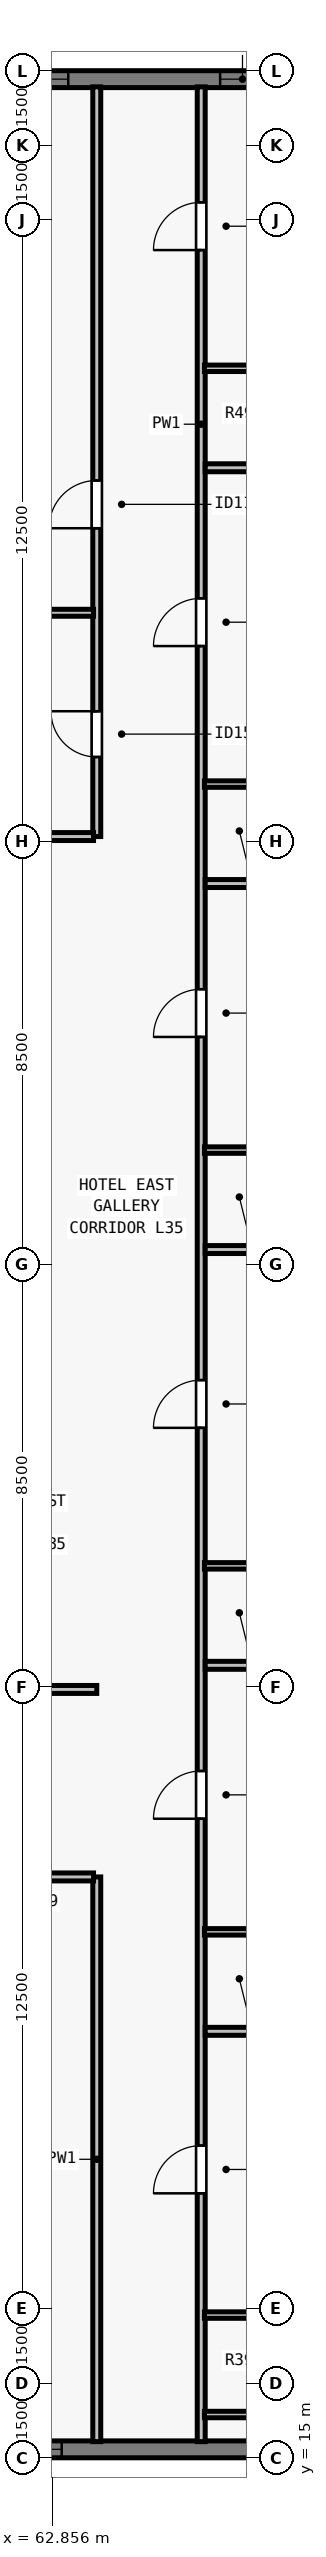
"""IFC4 building model, lengths in metres.
Left out: names, types, materials, properties, quantities, classifications, styles, units other than length and angle.
Written with IfcOpenShell. Run it as: python <this file> out.ifc"""

import sys

from ifc_helpers import new_model, si_unit, direction, frame, frame_2d, origin, place, context, subcontext, project, spatial, rectangle, extrude, element, fill, save


model = new_model("IFC4")
c1 = context("Model", 3, precision=1e-05, world=origin(), true_north=direction((0.0, 1.0)))
c2 = subcontext(c1, "Body", "Model", "MODEL_VIEW")
j1 = project(units=[si_unit("LENGTHUNIT", "METRE"), si_unit("PLANEANGLEUNIT", "RADIAN")], contexts=[c1])
p1 = place(None, origin())
s1 = spatial("IfcSite", under=j1, at=p1, CompositionType="ELEMENT")
p2 = place(p1, origin())
s2 = spatial("IfcBuilding", under=s1, at=p2, CompositionType="ELEMENT")
p3 = place(p2, frame((0.0, 0.0, 130.5)))
s3 = spatial("IfcBuildingStorey", under=s2, at=p3, CompositionType="ELEMENT", Elevation=130.5)
p4 = place(p3, frame((32.0, 62.83, 0.0), z_axis=(0.0, 0.0, 1.0), x_axis=(1.0, 0.0, 0.0)))
e1 = element("IfcWall", 1, at=p4, inside=s3, PredefinedType="SOLIDWALL", context=c2, shape_type="SweptSolid", body=[
    extrude(rectangle(XDim=39.682, YDim=0.34, at=frame_2d((19.841, 0.0))), origin(), (0.0, 0.0, 1.0), 3.28),
])
p5 = place(p4, frame((4.752, 0.0, 0.8)))
e2 = element("IfcOpeningElement", 2, at=p5, cuts=e1, PredefinedType="OPENING", context=c2, shape_type="SweptSolid", body=[
    extrude(rectangle(XDim=1.75, YDim=1.66, at=frame_2d((0.875, 0.83))), frame((0.0, 0.18, 0.0), z_axis=(0.0, -1.0, 0.0), x_axis=(1.0, 0.0, 0.0)), (0.0, 0.0, 1.0), 0.36),
])
p6 = place(p4, frame((11.859, 0.0, 0.8)))
e3 = element("IfcOpeningElement", 3, at=p6, cuts=e1, PredefinedType="OPENING", context=c2, shape_type="SweptSolid", body=[
    extrude(rectangle(XDim=1.75, YDim=1.66, at=frame_2d((0.875, 0.83))), frame((0.0, 0.18, 0.0), z_axis=(0.0, -1.0, 0.0), x_axis=(1.0, 0.0, 0.0)), (0.0, 0.0, 1.0), 0.36),
])
p7 = place(p4, frame((16.062, 0.0, 0.8)))
e4 = element("IfcOpeningElement", 4, at=p7, cuts=e1, PredefinedType="OPENING", context=c2, shape_type="SweptSolid", body=[
    extrude(rectangle(XDim=1.35, YDim=1.66, at=frame_2d((0.675, 0.83))), frame((0.0, 0.18, 0.0), z_axis=(0.0, -1.0, 0.0), x_axis=(1.0, 0.0, 0.0)), (0.0, 0.0, 1.0), 0.36),
])
p8 = place(p4, frame((18.966, 0.0, 0.8)))
e5 = element("IfcOpeningElement", 5, at=p8, cuts=e1, PredefinedType="OPENING", context=c2, shape_type="SweptSolid", body=[
    extrude(rectangle(XDim=1.75, YDim=1.66, at=frame_2d((0.875, 0.83))), frame((0.0, 0.18, 0.0), z_axis=(0.0, -1.0, 0.0), x_axis=(1.0, 0.0, 0.0)), (0.0, 0.0, 1.0), 0.36),
])
p9 = place(p4, frame((22.719, 0.0, 0.8)))
e6 = element("IfcOpeningElement", 6, at=p9, cuts=e1, PredefinedType="OPENING", context=c2, shape_type="SweptSolid", body=[
    extrude(rectangle(XDim=1.35, YDim=1.66, at=frame_2d((0.675, 0.83))), frame((0.0, 0.18, 0.0), z_axis=(0.0, -1.0, 0.0), x_axis=(1.0, 0.0, 0.0)), (0.0, 0.0, 1.0), 0.36),
])
p10 = place(p4, frame((26.073, 0.0, 0.8)))
e7 = element("IfcOpeningElement", 7, at=p10, cuts=e1, PredefinedType="OPENING", context=c2, shape_type="SweptSolid", body=[
    extrude(rectangle(XDim=1.75, YDim=1.66, at=frame_2d((0.875, 0.83))), frame((0.0, 0.18, 0.0), z_axis=(0.0, -1.0, 0.0), x_axis=(1.0, 0.0, 0.0)), (0.0, 0.0, 1.0), 0.36),
])
p11 = place(p4, frame((29.827, 0.0, 0.8)))
e8 = element("IfcOpeningElement", 8, at=p11, cuts=e1, PredefinedType="OPENING", context=c2, shape_type="SweptSolid", body=[
    extrude(rectangle(XDim=1.35, YDim=1.66, at=frame_2d((0.675, 0.83))), frame((0.0, 0.18, 0.0), z_axis=(0.0, -1.0, 0.0), x_axis=(1.0, 0.0, 0.0)), (0.0, 0.0, 1.0), 0.36),
])
p12 = place(p4, frame((34.23, 0.0, 0.8)))
e9 = element("IfcOpeningElement", 9, at=p12, cuts=e1, PredefinedType="OPENING", context=c2, shape_type="SweptSolid", body=[
    extrude(rectangle(XDim=0.9, YDim=1.66, at=frame_2d((0.45, 0.83))), frame((0.0, 0.18, 0.0), z_axis=(0.0, -1.0, 0.0), x_axis=(1.0, 0.0, 0.0)), (0.0, 0.0, 1.0), 0.36),
])
p13 = place(p3, frame((72.0, 15.17, 0.0), z_axis=(0.0, 0.0, 1.0), x_axis=(-1.0, 0.0, 0.0)))
e10 = element("IfcWall", 10, at=p13, inside=s3, PredefinedType="SOLIDWALL", context=c2, shape_type="SweptSolid", body=[
    extrude(rectangle(XDim=39.682, YDim=0.34, at=frame_2d((19.841, 0.0))), origin(), (0.0, 0.0, 1.0), 3.28),
])
p14 = place(p13, frame((8.955, 0.0, 0.8)))
e11 = element("IfcOpeningElement", 11, at=p14, cuts=e10, PredefinedType="OPENING", context=c2, shape_type="SweptSolid", body=[
    extrude(rectangle(XDim=1.35, YDim=1.66, at=frame_2d((0.675, 0.83))), frame((0.0, 0.18, 0.0), z_axis=(0.0, -1.0, 0.0), x_axis=(1.0, 0.0, 0.0)), (0.0, 0.0, 1.0), 0.36),
])
p15 = place(p13, frame((11.859, 0.0, 0.8)))
e12 = element("IfcOpeningElement", 12, at=p15, cuts=e10, PredefinedType="OPENING", context=c2, shape_type="SweptSolid", body=[
    extrude(rectangle(XDim=1.75, YDim=1.66, at=frame_2d((0.875, 0.83))), frame((0.0, 0.18, 0.0), z_axis=(0.0, -1.0, 0.0), x_axis=(1.0, 0.0, 0.0)), (0.0, 0.0, 1.0), 0.36),
])
p16 = place(p13, frame((16.062, 0.0, 0.8)))
e13 = element("IfcOpeningElement", 13, at=p16, cuts=e10, PredefinedType="OPENING", context=c2, shape_type="SweptSolid", body=[
    extrude(rectangle(XDim=1.35, YDim=1.66, at=frame_2d((0.675, 0.83))), frame((0.0, 0.18, 0.0), z_axis=(0.0, -1.0, 0.0), x_axis=(1.0, 0.0, 0.0)), (0.0, 0.0, 1.0), 0.36),
])
p17 = place(p13, frame((18.966, 0.0, 0.8)))
e14 = element("IfcOpeningElement", 14, at=p17, cuts=e10, PredefinedType="OPENING", context=c2, shape_type="SweptSolid", body=[
    extrude(rectangle(XDim=1.75, YDim=1.66, at=frame_2d((0.875, 0.83))), frame((0.0, 0.18, 0.0), z_axis=(0.0, -1.0, 0.0), x_axis=(1.0, 0.0, 0.0)), (0.0, 0.0, 1.0), 0.36),
])
p18 = place(p13, frame((21.469, 0.0, 0.8)))
e15 = element("IfcOpeningElement", 15, at=p18, cuts=e10, PredefinedType="OPENING", context=c2, shape_type="SweptSolid", body=[
    extrude(rectangle(XDim=1.35, YDim=1.66, at=frame_2d((0.675, 0.83))), frame((0.0, 0.18, 0.0), z_axis=(0.0, -1.0, 0.0), x_axis=(1.0, 0.0, 0.0)), (0.0, 0.0, 1.0), 0.36),
])
p19 = place(p13, frame((26.073, 0.0, 0.8)))
e16 = element("IfcOpeningElement", 16, at=p19, cuts=e10, PredefinedType="OPENING", context=c2, shape_type="SweptSolid", body=[
    extrude(rectangle(XDim=1.75, YDim=1.66, at=frame_2d((0.875, 0.83))), frame((0.0, 0.18, 0.0), z_axis=(0.0, -1.0, 0.0), x_axis=(1.0, 0.0, 0.0)), (0.0, 0.0, 1.0), 0.36),
])
p20 = place(p13, frame((28.577, 0.0, 0.8)))
e17 = element("IfcOpeningElement", 17, at=p20, cuts=e10, PredefinedType="OPENING", context=c2, shape_type="SweptSolid", body=[
    extrude(rectangle(XDim=1.35, YDim=1.66, at=frame_2d((0.675, 0.83))), frame((0.0, 0.18, 0.0), z_axis=(0.0, -1.0, 0.0), x_axis=(1.0, 0.0, 0.0)), (0.0, 0.0, 1.0), 0.36),
])
p21 = place(p3, frame((65.85, 15.325, 0.0), z_axis=(0.0, 0.0, 1.0), x_axis=(0.0, 1.0, 0.0)))
e18 = element("IfcWall", 18, at=p21, inside=s3, PredefinedType="PARTITIONING", context=c2, shape_type="SweptSolid", body=[
    extrude(rectangle(XDim=47.35, YDim=0.16, at=frame_2d((23.675, 0.0))), origin(), (0.0, 0.0, 1.0), 2.555),
])
p22 = place(p21, frame((4.993, 0.0, 0.0)))
e19 = element("IfcOpeningElement", 19, at=p22, cuts=e18, PredefinedType="OPENING", context=c2, shape_type="SweptSolid", body=[
    extrude(rectangle(XDim=0.96, YDim=2.15, at=frame_2d((0.48, 1.075))), frame((0.0, 0.09, 0.0), z_axis=(0.0, -1.0, 0.0), x_axis=(1.0, 0.0, 0.0)), (0.0, 0.0, 1.0), 0.18),
])
p23 = place(p21, frame((12.525, 0.0, 0.0)))
e20 = element("IfcOpeningElement", 20, at=p23, cuts=e18, PredefinedType="OPENING", context=c2, shape_type="SweptSolid", body=[
    extrude(rectangle(XDim=0.96, YDim=2.15, at=frame_2d((0.48, 1.075))), frame((0.0, 0.09, 0.0), z_axis=(0.0, -1.0, 0.0), x_axis=(1.0, 0.0, 0.0)), (0.0, 0.0, 1.0), 0.18),
])
p24 = place(p21, frame((20.385, 0.0, 0.0)))
e21 = element("IfcOpeningElement", 21, at=p24, cuts=e18, PredefinedType="OPENING", context=c2, shape_type="SweptSolid", body=[
    extrude(rectangle(XDim=0.96, YDim=2.15, at=frame_2d((0.48, 1.075))), frame((0.0, 0.09, 0.0), z_axis=(0.0, -1.0, 0.0), x_axis=(1.0, 0.0, 0.0)), (0.0, 0.0, 1.0), 0.18),
])
p25 = place(p21, frame((28.246, 0.0, 0.0)))
e22 = element("IfcOpeningElement", 22, at=p25, cuts=e18, PredefinedType="OPENING", context=c2, shape_type="SweptSolid", body=[
    extrude(rectangle(XDim=0.96, YDim=2.15, at=frame_2d((0.48, 1.075))), frame((0.0, 0.09, 0.0), z_axis=(0.0, -1.0, 0.0), x_axis=(1.0, 0.0, 0.0)), (0.0, 0.0, 1.0), 0.18),
])
p26 = place(p21, frame((36.105, 0.0, 0.0)))
e23 = element("IfcOpeningElement", 23, at=p26, cuts=e18, PredefinedType="OPENING", context=c2, shape_type="SweptSolid", body=[
    extrude(rectangle(XDim=0.96, YDim=2.15, at=frame_2d((0.48, 1.075))), frame((0.0, 0.09, 0.0), z_axis=(0.0, -1.0, 0.0), x_axis=(1.0, 0.0, 0.0)), (0.0, 0.0, 1.0), 0.18),
])
p27 = place(p21, frame((44.068, 0.0, 0.0)))
e24 = element("IfcOpeningElement", 24, at=p27, cuts=e18, PredefinedType="OPENING", context=c2, shape_type="SweptSolid", body=[
    extrude(rectangle(XDim=0.96, YDim=2.15, at=frame_2d((0.48, 1.075))), frame((0.0, 0.09, 0.0), z_axis=(0.0, -1.0, 0.0), x_axis=(1.0, 0.0, 0.0)), (0.0, 0.0, 1.0), 0.18),
])
p28 = place(p3, frame((63.75, 15.325, 0.0), z_axis=(0.0, 0.0, 1.0), x_axis=(0.0, 1.0, 0.0)))
e25 = element("IfcWall", 25, at=p28, inside=s3, PredefinedType="PARTITIONING", context=c2, shape_type="SweptSolid", body=[
    extrude(rectangle(XDim=11.355, YDim=0.16, at=frame_2d((5.677, 0.0))), origin(), (0.0, 0.0, 1.0), 2.555),
])
p29 = place(p3, frame((63.75, 47.6, 0.0), z_axis=(0.0, 0.0, 1.0), x_axis=(0.0, 1.0, 0.0)))
e26 = element("IfcWall", 26, at=p29, inside=s3, PredefinedType="PARTITIONING", context=c2, shape_type="SweptSolid", body=[
    extrude(rectangle(XDim=15.075, YDim=0.16, at=frame_2d((7.538, 0.0))), origin(), (0.0, 0.0, 1.0), 2.555),
])
p30 = place(p29, frame((1.6, 0.0, 0.0)))
e27 = element("IfcOpeningElement", 27, at=p30, cuts=e26, PredefinedType="OPENING", context=c2, shape_type="SweptSolid", body=[
    extrude(rectangle(XDim=0.92, YDim=2.12, at=frame_2d((0.46, 1.06))), frame((0.0, 0.09, 0.0), z_axis=(0.0, -1.0, 0.0), x_axis=(1.0, 0.0, 0.0)), (0.0, 0.0, 1.0), 0.18),
])
p31 = place(p29, frame((6.2, 0.0, 0.0)))
e28 = element("IfcOpeningElement", 28, at=p31, cuts=e26, PredefinedType="OPENING", context=c2, shape_type="SweptSolid", body=[
    extrude(rectangle(XDim=0.96, YDim=2.12, at=frame_2d((0.48, 1.06))), frame((0.0, 0.09, 0.0), z_axis=(0.0, -1.0, 0.0), x_axis=(1.0, 0.0, 0.0)), (0.0, 0.0, 1.0), 0.18),
])
p32 = place(p3, frame((60.765, 30.45, 0.0), z_axis=(0.0, 0.0, 1.0), x_axis=(1.0, 0.0, 0.0)))
e29 = element("IfcWall", 29, at=p32, inside=s3, PredefinedType="PARTITIONING", context=c2, shape_type="SweptSolid", body=[
    extrude(rectangle(XDim=2.985, YDim=0.16, at=frame_2d((1.493, 0.0))), origin(), (0.0, 0.0, 1.0), 3.28),
])
p33 = place(p3, frame((60.765, 47.6, 0.0), z_axis=(0.0, 0.0, 1.0), x_axis=(1.0, 0.0, 0.0)))
e30 = element("IfcWall", 30, at=p33, inside=s3, PredefinedType="PARTITIONING", context=c2, shape_type="SweptSolid", body=[
    extrude(rectangle(XDim=2.92, YDim=0.16, at=frame_2d((1.46, 0.0))), origin(), (0.0, 0.0, 1.0), 3.28),
])
p34 = place(p3, frame((41.615, 26.68, 0.0), z_axis=(0.0, 0.0, 1.0), x_axis=(1.0, 0.0, 0.0)))
e31 = element("IfcWall", 31, at=p34, inside=s3, PredefinedType="PARTITIONING", context=c2, shape_type="SweptSolid", body=[
    extrude(rectangle(XDim=22.07, YDim=0.16, at=frame_2d((11.035, 0.0))), origin(), (0.0, 0.0, 1.0), 3.28),
])
p35 = place(p34, frame((4.281, 0.0, 0.0)))
e32 = element("IfcOpeningElement", 32, at=p35, cuts=e31, PredefinedType="OPENING", context=c2, shape_type="SweptSolid", body=[
    extrude(rectangle(XDim=0.96, YDim=2.15, at=frame_2d((0.48, 1.075))), frame((0.0, 0.09, 0.0), z_axis=(0.0, -1.0, 0.0), x_axis=(1.0, 0.0, 0.0)), (0.0, 0.0, 1.0), 0.18),
])
p36 = place(p34, frame((11.56, 0.0, 0.0)))
e33 = element("IfcOpeningElement", 33, at=p36, cuts=e31, PredefinedType="OPENING", context=c2, shape_type="SweptSolid", body=[
    extrude(rectangle(XDim=0.96, YDim=2.15, at=frame_2d((0.48, 1.075))), frame((0.0, 0.09, 0.0), z_axis=(0.0, -1.0, 0.0), x_axis=(1.0, 0.0, 0.0)), (0.0, 0.0, 1.0), 0.18),
])
p37 = place(p34, frame((19.134, 0.0, 0.0)))
e34 = element("IfcOpeningElement", 34, at=p37, cuts=e31, PredefinedType="OPENING", context=c2, shape_type="SweptSolid", body=[
    extrude(rectangle(XDim=0.96, YDim=2.15, at=frame_2d((0.48, 1.075))), frame((0.0, 0.09, 0.0), z_axis=(0.0, -1.0, 0.0), x_axis=(1.0, 0.0, 0.0)), (0.0, 0.0, 1.0), 0.18),
])
p38 = place(p3, frame((53.555, 52.1, 0.0), z_axis=(0.0, 0.0, 1.0), x_axis=(1.0, 0.0, 0.0)))
e35 = element("IfcWall", 35, at=p38, inside=s3, PredefinedType="PARTITIONING", context=c2, shape_type="SweptSolid", body=[
    extrude(rectangle(XDim=10.13, YDim=0.14, at=frame_2d((5.065, 0.0))), origin(), (0.0, 0.0, 1.0), 3.28),
])
for number, where, z_axis, x_axis in (
    (36, (65.915, 15.87, 0.0), (0.0, 0.0, 1.0), (1.0, 0.0, 0.0)),
    (37, (65.915, 17.87, 0.0), (0.0, 0.0, 1.0), (1.0, 0.0, 0.0)),
):
    element("IfcWall", number, at=place(p3, frame(where, z_axis=z_axis, x_axis=x_axis)), inside=s3, PredefinedType="PLUMBINGWALL", context=c2, shape_type="SweptSolid", body=[
        extrude(rectangle(XDim=2.315, YDim=0.13, at=frame_2d((1.157, 0.0))), origin(), (0.0, 0.0, 1.0), 3.28),
    ])
p39 = place(p3, frame((65.93, 23.576, 0.0), z_axis=(0.0, 0.0, 1.0), x_axis=(1.0, 0.0, 0.0)))
e38 = element("IfcWall", 38, at=p39, inside=s3, PredefinedType="PARTITIONING", context=c2, shape_type="SweptSolid", body=[
    extrude(rectangle(XDim=9.745, YDim=0.16, at=frame_2d((4.873, 0.0))), origin(), (0.0, 0.0, 1.0), 2.896),
])
p40 = place(p3, frame((65.915, 25.576, 0.0), z_axis=(0.0, 0.0, 1.0), x_axis=(1.0, 0.0, 0.0)))
e39 = element("IfcWall", 39, at=p40, inside=s3, PredefinedType="PLUMBINGWALL", context=c2, shape_type="SweptSolid", body=[
    extrude(rectangle(XDim=2.315, YDim=0.13, at=frame_2d((1.157, 0.0))), origin(), (0.0, 0.0, 1.0), 2.896),
])
p41 = place(p3, frame((65.93, 30.935, 0.0), z_axis=(0.0, 0.0, 1.0), x_axis=(1.0, 0.0, 0.0)))
e40 = element("IfcWall", 40, at=p41, inside=s3, PredefinedType="PARTITIONING", context=c2, shape_type="SweptSolid", body=[
    extrude(rectangle(XDim=9.745, YDim=0.16, at=frame_2d((4.873, 0.0))), origin(), (0.0, 0.0, 1.0), 3.28),
])
p42 = place(p3, frame((65.915, 32.935, 0.0), z_axis=(0.0, 0.0, 1.0), x_axis=(1.0, 0.0, 0.0)))
e41 = element("IfcWall", 41, at=p42, inside=s3, PredefinedType="PLUMBINGWALL", context=c2, shape_type="SweptSolid", body=[
    extrude(rectangle(XDim=2.315, YDim=0.13, at=frame_2d((1.157, 0.0))), origin(), (0.0, 0.0, 1.0), 3.28),
])
p43 = place(p3, frame((65.93, 39.296, 0.0), z_axis=(0.0, 0.0, 1.0), x_axis=(1.0, 0.0, 0.0)))
e42 = element("IfcWall", 42, at=p43, inside=s3, PredefinedType="PARTITIONING", context=c2, shape_type="SweptSolid", body=[
    extrude(rectangle(XDim=9.745, YDim=0.16, at=frame_2d((4.873, 0.0))), origin(), (0.0, 0.0, 1.0), 3.28),
])
p44 = place(p3, frame((65.915, 41.296, 0.0), z_axis=(0.0, 0.0, 1.0), x_axis=(1.0, 0.0, 0.0)))
e43 = element("IfcWall", 43, at=p44, inside=s3, PredefinedType="PLUMBINGWALL", context=c2, shape_type="SweptSolid", body=[
    extrude(rectangle(XDim=2.315, YDim=0.13, at=frame_2d((1.157, 0.0))), origin(), (0.0, 0.0, 1.0), 3.28),
])
p45 = place(p3, frame((65.93, 46.655, 0.0), z_axis=(0.0, 0.0, 1.0), x_axis=(1.0, 0.0, 0.0)))
e44 = element("IfcWall", 44, at=p45, inside=s3, PredefinedType="PARTITIONING", context=c2, shape_type="SweptSolid", body=[
    extrude(rectangle(XDim=9.745, YDim=0.16, at=frame_2d((4.873, 0.0))), origin(), (0.0, 0.0, 1.0), 3.28),
])
p46 = place(p3, frame((65.915, 48.655, 0.0), z_axis=(0.0, 0.0, 1.0), x_axis=(1.0, 0.0, 0.0)))
e45 = element("IfcWall", 45, at=p46, inside=s3, PredefinedType="PLUMBINGWALL", context=c2, shape_type="SweptSolid", body=[
    extrude(rectangle(XDim=2.315, YDim=0.13, at=frame_2d((1.157, 0.0))), origin(), (0.0, 0.0, 1.0), 3.28),
])
p47 = place(p3, frame((65.93, 55.016, 0.0), z_axis=(0.0, 0.0, 1.0), x_axis=(1.0, 0.0, 0.0)))
e46 = element("IfcWall", 46, at=p47, inside=s3, PredefinedType="PARTITIONING", context=c2, shape_type="SweptSolid", body=[
    extrude(rectangle(XDim=9.745, YDim=0.16, at=frame_2d((4.873, 0.0))), origin(), (0.0, 0.0, 1.0), 2.896),
])
p48 = place(p3, frame((65.915, 57.016, 0.0), z_axis=(0.0, 0.0, 1.0), x_axis=(1.0, 0.0, 0.0)))
e47 = element("IfcWall", 47, at=p48, inside=s3, PredefinedType="PLUMBINGWALL", context=c2, shape_type="SweptSolid", body=[
    extrude(rectangle(XDim=2.315, YDim=0.13, at=frame_2d((1.157, 0.0))), origin(), (0.0, 0.0, 1.0), 3.28),
])
p49 = place(p11, origin())
e48 = element("IfcWindow", 48, at=p49, inside=s3, PartitioningType="SINGLE_PANEL", PredefinedType="WINDOW", context=c2, shape_type="SweptSolid", body=[
    extrude(rectangle(XDim=1.35, YDim=1.66, at=frame_2d((0.675, 0.83))), frame((0.0, -0.05, 0.0), z_axis=(0.0, -1.0, 0.0), x_axis=(1.0, 0.0, 0.0)), (0.0, 0.0, 1.0), 0.06),
])
fill(e8, e48)
p50 = place(p14, origin())
e49 = element("IfcWindow", 49, at=p50, inside=s3, PartitioningType="SINGLE_PANEL", PredefinedType="WINDOW", context=c2, shape_type="SweptSolid", body=[
    extrude(rectangle(XDim=1.35, YDim=1.66, at=frame_2d((0.675, 0.83))), frame((0.0, -0.05, 0.0), z_axis=(0.0, -1.0, 0.0), x_axis=(1.0, 0.0, 0.0)), (0.0, 0.0, 1.0), 0.06),
])
fill(e11, e49)
p51 = place(p12, origin())
e50 = element("IfcWindow", 50, at=p51, inside=s3, PartitioningType="SINGLE_PANEL", PredefinedType="WINDOW", context=c2, shape_type="SweptSolid", body=[
    extrude(rectangle(XDim=0.9, YDim=1.66, at=frame_2d((0.45, 0.83))), frame((0.0, -0.04, 0.0), z_axis=(0.0, -1.0, 0.0), x_axis=(1.0, 0.0, 0.0)), (0.0, 0.0, 1.0), 0.06),
])
fill(e9, e50)
p52 = place(p30, origin())
e51 = element("IfcDoor", 51, at=p52, inside=s3, OperationType="SINGLE_SWING_RIGHT", PredefinedType="DOOR", context=c2, shape_type="SweptSolid", body=[
    extrude(rectangle(XDim=0.92, YDim=2.12, at=frame_2d((0.46, 1.06))), frame((0.0, 0.025, 0.0), z_axis=(0.0, -1.0, 0.0), x_axis=(1.0, 0.0, 0.0)), (0.0, 0.0, 1.0), 0.05),
])
fill(e27, e51)
p53 = place(p31, origin())
e52 = element("IfcDoor", 52, at=p53, inside=s3, OperationType="SINGLE_SWING_LEFT", PredefinedType="DOOR", context=c2, shape_type="SweptSolid", body=[
    extrude(rectangle(XDim=0.96, YDim=2.12, at=frame_2d((0.48, 1.06))), frame((0.0, 0.025, 0.0), z_axis=(0.0, -1.0, 0.0), x_axis=(1.0, 0.0, 0.0)), (0.0, 0.0, 1.0), 0.05),
])
fill(e28, e52)
p54 = place(p22, origin())
e53 = element("IfcDoor", 53, at=p54, inside=s3, OperationType="SINGLE_SWING_LEFT", PredefinedType="DOOR", context=c2, shape_type="SweptSolid", body=[
    extrude(rectangle(XDim=0.96, YDim=2.15, at=frame_2d((0.48, 1.075))), frame((0.0, 0.025, 0.0), z_axis=(0.0, -1.0, 0.0), x_axis=(1.0, 0.0, 0.0)), (0.0, 0.0, 1.0), 0.05),
])
fill(e19, e53)
p55 = place(p23, origin())
e54 = element("IfcDoor", 54, at=p55, inside=s3, OperationType="SINGLE_SWING_LEFT", PredefinedType="DOOR", context=c2, shape_type="SweptSolid", body=[
    extrude(rectangle(XDim=0.96, YDim=2.15, at=frame_2d((0.48, 1.075))), frame((0.0, 0.025, 0.0), z_axis=(0.0, -1.0, 0.0), x_axis=(1.0, 0.0, 0.0)), (0.0, 0.0, 1.0), 0.05),
])
fill(e20, e54)
p56 = place(p24, origin())
e55 = element("IfcDoor", 55, at=p56, inside=s3, OperationType="SINGLE_SWING_LEFT", PredefinedType="DOOR", context=c2, shape_type="SweptSolid", body=[
    extrude(rectangle(XDim=0.96, YDim=2.15, at=frame_2d((0.48, 1.075))), frame((0.0, 0.025, 0.0), z_axis=(0.0, -1.0, 0.0), x_axis=(1.0, 0.0, 0.0)), (0.0, 0.0, 1.0), 0.05),
])
fill(e21, e55)
p57 = place(p25, origin())
e56 = element("IfcDoor", 56, at=p57, inside=s3, OperationType="SINGLE_SWING_LEFT", PredefinedType="DOOR", context=c2, shape_type="SweptSolid", body=[
    extrude(rectangle(XDim=0.96, YDim=2.15, at=frame_2d((0.48, 1.075))), frame((0.0, 0.025, 0.0), z_axis=(0.0, -1.0, 0.0), x_axis=(1.0, 0.0, 0.0)), (0.0, 0.0, 1.0), 0.05),
])
fill(e22, e56)
p58 = place(p26, origin())
e57 = element("IfcDoor", 57, at=p58, inside=s3, OperationType="SINGLE_SWING_LEFT", PredefinedType="DOOR", context=c2, shape_type="SweptSolid", body=[
    extrude(rectangle(XDim=0.96, YDim=2.15, at=frame_2d((0.48, 1.075))), frame((0.0, 0.025, 0.0), z_axis=(0.0, -1.0, 0.0), x_axis=(1.0, 0.0, 0.0)), (0.0, 0.0, 1.0), 0.05),
])
fill(e23, e57)
p59 = place(p27, origin())
e58 = element("IfcDoor", 58, at=p59, inside=s3, OperationType="SINGLE_SWING_LEFT", PredefinedType="DOOR", context=c2, shape_type="SweptSolid", body=[
    extrude(rectangle(XDim=0.96, YDim=2.15, at=frame_2d((0.48, 1.075))), frame((0.0, 0.025, 0.0), z_axis=(0.0, -1.0, 0.0), x_axis=(1.0, 0.0, 0.0)), (0.0, 0.0, 1.0), 0.05),
])
fill(e24, e58)
save(model, sys.argv[1])
